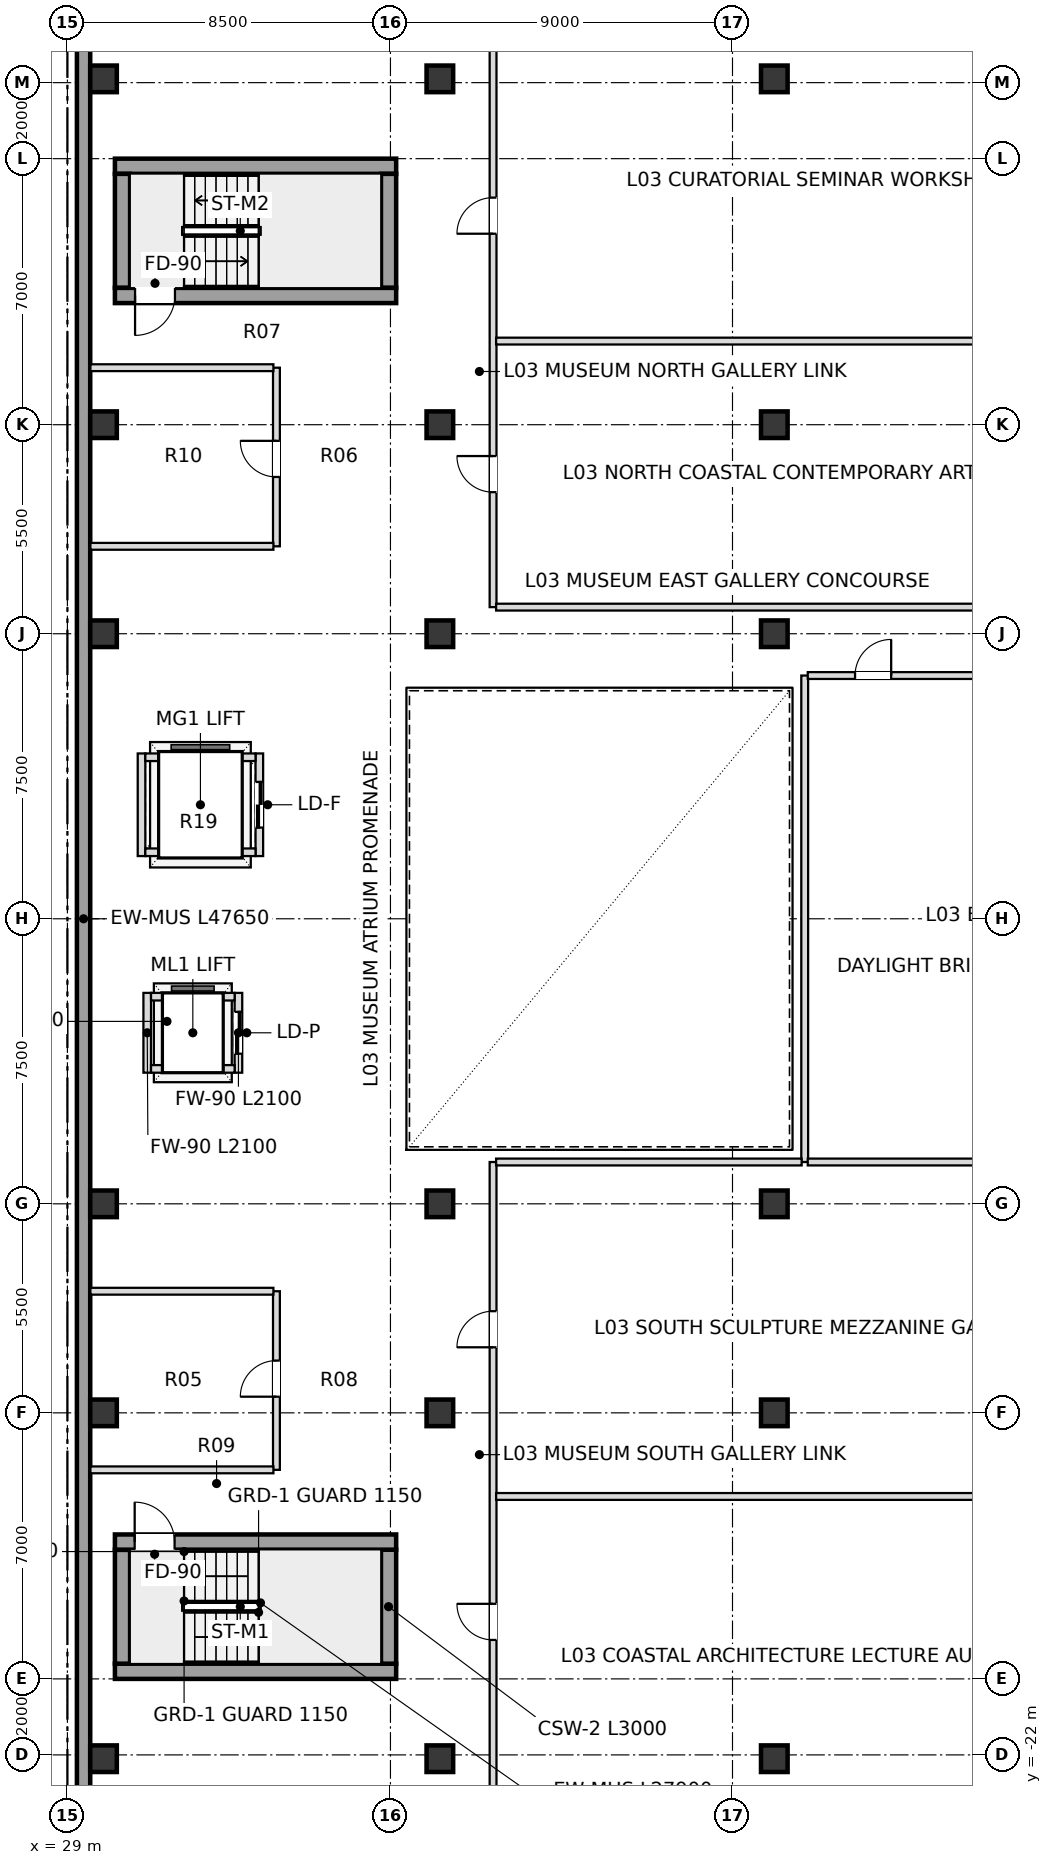
"""IFC4 building model, lengths in metres.
Left out: names, types, materials, properties, quantities, classifications, styles, units other than length and angle.
Written with IfcOpenShell. Run it as: python <this file> out.ifc"""

import sys

from ifc_helpers import new_model, si_unit, direction, frame, frame_2d, origin, origin_2d, place, context, subcontext, project, spatial, rectangle, extrude, element, fill, save


model = new_model("IFC4")
c1 = context("Model", 3, precision=1e-05, world=origin(), true_north=direction((0.0, 1.0)))
c2 = subcontext(c1, "Body", "Model", "MODEL_VIEW")
j1 = project(units=[si_unit("LENGTHUNIT", "METRE"), si_unit("PLANEANGLEUNIT", "RADIAN")], contexts=[c1])
p1 = place(None, origin())
s1 = spatial("IfcSite", under=j1, at=p1, CompositionType="ELEMENT")
p2 = place(p1, origin())
s2 = spatial("IfcBuilding", under=s1, at=p2, CompositionType="ELEMENT")
p3 = place(p2, frame((0.0, 0.0, 16.8)))
s3 = spatial("IfcBuildingStorey", under=s2, at=p3, CompositionType="ELEMENT", Elevation=16.8)
for number, where, z_axis, x_axis in (
    (1, (29.95, -22.1, 0.0), (0.0, 0.0, 1.0), (1.0, 0.0, 0.0)),
    (2, (29.95, -13.0, 0.0), (0.0, 0.0, 1.0), (1.0, 0.0, 0.0)),
    (3, (29.95, -7.5, 0.0), (0.0, 0.0, 1.0), (1.0, 0.0, 0.0)),
    (4, (29.95, 7.5, 0.0), (0.0, 0.0, 1.0), (1.0, 0.0, 0.0)),
    (5, (29.95, 13.0, 0.0), (0.0, 0.0, 1.0), (1.0, 0.0, 0.0)),
    (6, (29.95, 22.1, 0.0), (0.0, 0.0, 1.0), (1.0, 0.0, 0.0)),
    (7, (38.8, -22.1, 0.0), (0.0, 0.0, 1.0), (1.0, 0.0, 0.0)),
    (8, (38.8, -13.0, 0.0), (0.0, 0.0, 1.0), (1.0, 0.0, 0.0)),
    (9, (38.8, -7.5, 0.0), (0.0, 0.0, 1.0), (1.0, 0.0, 0.0)),
    (10, (38.8, 7.5, 0.0), (0.0, 0.0, 1.0), (1.0, 0.0, 0.0)),
    (11, (38.8, 13.0, 0.0), (0.0, 0.0, 1.0), (1.0, 0.0, 0.0)),
    (12, (38.8, 22.1, 0.0), (0.0, 0.0, 1.0), (1.0, 0.0, 0.0)),
    (13, (47.6, -22.1, 0.0), (0.0, 0.0, 1.0), (1.0, 0.0, 0.0)),
    (14, (47.6, -13.0, 0.0), (0.0, 0.0, 1.0), (1.0, 0.0, 0.0)),
    (15, (47.6, -7.5, 0.0), (0.0, 0.0, 1.0), (1.0, 0.0, 0.0)),
    (16, (47.6, 7.5, 0.0), (0.0, 0.0, 1.0), (1.0, 0.0, 0.0)),
    (17, (47.6, 13.0, 0.0), (0.0, 0.0, 1.0), (1.0, 0.0, 0.0)),
    (18, (47.6, 22.1, 0.0), (0.0, 0.0, 1.0), (1.0, 0.0, 0.0)),
):
    element("IfcColumn", number, at=place(p3, frame(where, z_axis=z_axis, x_axis=x_axis)), inside=s3, PredefinedType="COLUMN", context=c2, shape_type="SweptSolid", body=[
        extrude(rectangle(XDim=0.7, YDim=0.7, at=origin_2d()), origin(), (0.0, 0.0, 1.0), 5.4),
    ])
p4 = place(p3, frame((29.425, 23.825, 0.0), z_axis=(0.0, 0.0, 1.0), x_axis=(0.0, -1.0, 0.0)))
e19 = element("IfcWall", 19, at=p4, inside=s3, PredefinedType="SOLIDWALL", context=c2, shape_type="SweptSolid", body=[
    extrude(rectangle(XDim=47.65, YDim=0.35, at=frame_2d((23.825, 0.0))), origin(), (0.0, 0.0, 1.0), 5.08),
])
p5 = place(p3, frame((37.65, -19.8, 0.0), z_axis=(0.0, 0.0, 1.0), x_axis=(-1.0, 0.0, 0.0)))
e20 = element("IfcWall", 20, at=p5, inside=s3, PredefinedType="SHEAR", context=c2, shape_type="SweptSolid", body=[
    extrude(rectangle(XDim=7.4, YDim=0.4, at=frame_2d((3.7, 0.0))), origin(), (0.0, 0.0, 1.0), 5.08),
])
for number, where, z_axis, x_axis in (
    (21, (37.45, -19.6, 0.0), (0.0, 0.0, 1.0), (0.0, 1.0, 0.0)),
    (22, (30.45, -19.6, 0.0), (0.0, 0.0, 1.0), (0.0, 1.0, 0.0)),
):
    element("IfcWall", number, at=place(p3, frame(where, z_axis=z_axis, x_axis=x_axis)), inside=s3, PredefinedType="SHEAR", context=c2, shape_type="SweptSolid", body=[
        extrude(rectangle(XDim=3.0, YDim=0.4, at=frame_2d((1.5, 0.0))), origin(), (0.0, 0.0, 1.0), 5.08),
    ])
p6 = place(p3, frame((30.25, -16.4, 0.0), z_axis=(0.0, 0.0, 1.0), x_axis=(1.0, 0.0, 0.0)))
e23 = element("IfcWall", 23, at=p6, inside=s3, PredefinedType="SHEAR", context=c2, shape_type="SweptSolid", body=[
    extrude(rectangle(XDim=7.4, YDim=0.4, at=frame_2d((3.7, 0.0))), origin(), (0.0, 0.0, 1.0), 5.08),
])
p7 = place(p6, frame((0.52, 0.0, 0.0)))
e24 = element("IfcOpeningElement", 24, at=p7, cuts=e23, PredefinedType="OPENING", context=c2, shape_type="SweptSolid", body=[
    extrude(rectangle(XDim=1.05, YDim=2.15, at=frame_2d((0.525, 1.075))), frame((0.0, 0.21, 0.0), z_axis=(0.0, -1.0, 0.0), x_axis=(1.0, 0.0, 0.0)), (0.0, 0.0, 1.0), 0.42),
])
p8 = place(p3, frame((30.25, 19.8, 0.0), z_axis=(0.0, 0.0, 1.0), x_axis=(1.0, 0.0, 0.0)))
e25 = element("IfcWall", 25, at=p8, inside=s3, PredefinedType="SHEAR", context=c2, shape_type="SweptSolid", body=[
    extrude(rectangle(XDim=7.4, YDim=0.4, at=frame_2d((3.7, 0.0))), origin(), (0.0, 0.0, 1.0), 5.08),
])
for number, where, z_axis, x_axis in (
    (26, (37.45, 16.6, 0.0), (0.0, 0.0, 1.0), (0.0, 1.0, 0.0)),
    (27, (30.45, 16.6, 0.0), (0.0, 0.0, 1.0), (0.0, 1.0, 0.0)),
):
    element("IfcWall", number, at=place(p3, frame(where, z_axis=z_axis, x_axis=x_axis)), inside=s3, PredefinedType="SHEAR", context=c2, shape_type="SweptSolid", body=[
        extrude(rectangle(XDim=3.0, YDim=0.4, at=frame_2d((1.5, 0.0))), origin(), (0.0, 0.0, 1.0), 5.08),
    ])
p9 = place(p3, frame((37.65, 16.4, 0.0), z_axis=(0.0, 0.0, 1.0), x_axis=(-1.0, 0.0, 0.0)))
e28 = element("IfcWall", 28, at=p9, inside=s3, PredefinedType="SHEAR", context=c2, shape_type="SweptSolid", body=[
    extrude(rectangle(XDim=7.4, YDim=0.4, at=frame_2d((3.7, 0.0))), origin(), (0.0, 0.0, 1.0), 5.08),
])
p10 = place(p9, frame((5.82, 0.0, 0.0)))
e29 = element("IfcOpeningElement", 29, at=p10, cuts=e28, PredefinedType="OPENING", context=c2, shape_type="SweptSolid", body=[
    extrude(rectangle(XDim=1.05, YDim=2.15, at=frame_2d((0.525, 1.075))), frame((0.0, 0.21, 0.0), z_axis=(0.0, -1.0, 0.0), x_axis=(1.0, 0.0, 0.0)), (0.0, 0.0, 1.0), 0.42),
])
p11 = place(p3, frame((33.5, -4.05, 0.0), z_axis=(0.0, 0.0, 1.0), x_axis=(0.0, 1.0, 0.0)))
e30 = element("IfcWall", 30, at=p11, inside=s3, PredefinedType="SOLIDWALL", context=c2, shape_type="SweptSolid", body=[
    extrude(rectangle(XDim=2.1, YDim=0.2, at=frame_2d((1.05, 0.0))), origin(), (0.0, 0.0, 1.0), 4.297),
])
p12 = place(p11, frame((0.5, 0.0, 0.0)))
e31 = element("IfcOpeningElement", 31, at=p12, cuts=e30, PredefinedType="OPENING", context=c2, shape_type="SweptSolid", body=[
    extrude(rectangle(XDim=1.1, YDim=2.15, at=frame_2d((0.55, 1.075))), frame((0.0, 0.11, 0.0), z_axis=(0.0, -1.0, 0.0), x_axis=(1.0, 0.0, 0.0)), (0.0, 0.0, 1.0), 0.22),
])
p13 = place(p3, frame((31.1, -4.05, 0.0), z_axis=(0.0, 0.0, 1.0), x_axis=(0.0, 1.0, 0.0)))
e32 = element("IfcWall", 32, at=p13, inside=s3, PredefinedType="SOLIDWALL", context=c2, shape_type="SweptSolid", body=[
    extrude(rectangle(XDim=2.1, YDim=0.2, at=frame_2d((1.05, 0.0))), origin(), (0.0, 0.0, 1.0), 4.297),
])
for number, where, z_axis, x_axis in (
    (33, (31.2, -3.95, 0.0), (0.0, 0.0, 1.0), (1.0, 0.0, 0.0)),
    (34, (31.2, -2.05, 0.0), (0.0, 0.0, 1.0), (1.0, 0.0, 0.0)),
):
    element("IfcWall", number, at=place(p3, frame(where, z_axis=z_axis, x_axis=x_axis)), inside=s3, PredefinedType="SOLIDWALL", context=c2, shape_type="SweptSolid", body=[
        extrude(rectangle(XDim=2.2, YDim=0.2, at=frame_2d((1.1, 0.0))), origin(), (0.0, 0.0, 1.0), 4.297),
    ])
p14 = place(p3, frame((34.05, 1.65, 0.0), z_axis=(0.0, 0.0, 1.0), x_axis=(0.0, 1.0, 0.0)))
e35 = element("IfcWall", 35, at=p14, inside=s3, PredefinedType="SOLIDWALL", context=c2, shape_type="SweptSolid", body=[
    extrude(rectangle(XDim=2.7, YDim=0.2, at=frame_2d((1.35, 0.0))), origin(), (0.0, 0.0, 1.0), 4.297),
])
p15 = place(p14, frame((0.75, 0.0, 0.0)))
e36 = element("IfcOpeningElement", 36, at=p15, cuts=e35, PredefinedType="OPENING", context=c2, shape_type="SweptSolid", body=[
    extrude(rectangle(XDim=1.2, YDim=2.2, at=frame_2d((0.6, 1.1))), frame((0.0, 0.11, 0.0), z_axis=(0.0, -1.0, 0.0), x_axis=(1.0, 0.0, 0.0)), (0.0, 0.0, 1.0), 0.22),
])
p16 = place(p3, frame((30.95, 1.65, 0.0), z_axis=(0.0, 0.0, 1.0), x_axis=(0.0, 1.0, 0.0)))
e37 = element("IfcWall", 37, at=p16, inside=s3, PredefinedType="SOLIDWALL", context=c2, shape_type="SweptSolid", body=[
    extrude(rectangle(XDim=2.7, YDim=0.2, at=frame_2d((1.35, 0.0))), origin(), (0.0, 0.0, 1.0), 4.297),
])
for number, where, z_axis, x_axis in (
    (38, (31.05, 1.75, 0.0), (0.0, 0.0, 1.0), (1.0, 0.0, 0.0)),
    (39, (31.05, 4.25, 0.0), (0.0, 0.0, 1.0), (1.0, 0.0, 0.0)),
):
    element("IfcWall", number, at=place(p3, frame(where, z_axis=z_axis, x_axis=x_axis)), inside=s3, PredefinedType="SOLIDWALL", context=c2, shape_type="SweptSolid", body=[
        extrude(rectangle(XDim=2.9, YDim=0.2, at=frame_2d((1.45, 0.0))), origin(), (0.0, 0.0, 1.0), 4.297),
    ])
p17 = place(p3, frame((34.5, -14.5, 0.0), z_axis=(0.0, 0.0, 1.0), x_axis=(0.0, 1.0, 0.0)))
e40 = element("IfcWall", 40, at=p17, inside=s3, PredefinedType="PARTITIONING", context=c2, shape_type="SweptSolid", body=[
    extrude(rectangle(XDim=4.7, YDim=0.18, at=frame_2d((2.35, 0.0))), origin(), (0.0, 0.0, 1.0), 4.297),
])
p18 = place(p17, frame((1.925, 0.0, 0.0)))
e41 = element("IfcOpeningElement", 41, at=p18, cuts=e40, PredefinedType="OPENING", context=c2, shape_type="SweptSolid", body=[
    extrude(rectangle(XDim=0.95, YDim=2.15, at=frame_2d((0.475, 1.075))), frame((0.0, 0.1, 0.0), z_axis=(0.0, -1.0, 0.0), x_axis=(1.0, 0.0, 0.0)), (0.0, 0.0, 1.0), 0.2),
])
p19 = place(p3, frame((34.5, 9.8, 0.0), z_axis=(0.0, 0.0, 1.0), x_axis=(0.0, 1.0, 0.0)))
e42 = element("IfcWall", 42, at=p19, inside=s3, PredefinedType="PARTITIONING", context=c2, shape_type="SweptSolid", body=[
    extrude(rectangle(XDim=4.7, YDim=0.18, at=frame_2d((2.35, 0.0))), origin(), (0.0, 0.0, 1.0), 4.297),
])
p20 = place(p19, frame((1.825, 0.0, 0.0)))
e43 = element("IfcOpeningElement", 43, at=p20, cuts=e42, PredefinedType="OPENING", context=c2, shape_type="SweptSolid", body=[
    extrude(rectangle(XDim=0.95, YDim=2.15, at=frame_2d((0.475, 1.075))), frame((0.0, 0.1, 0.0), z_axis=(0.0, -1.0, 0.0), x_axis=(1.0, 0.0, 0.0)), (0.0, 0.0, 1.0), 0.2),
])
p21 = place(p3, frame((40.2, -23.645, 0.0), z_axis=(0.0, 0.0, 1.0), x_axis=(0.0, 1.0, 0.0)))
e44 = element("IfcWall", 44, at=p21, inside=s3, PredefinedType="PARTITIONING", context=c2, shape_type="SweptSolid", body=[
    extrude(rectangle(XDim=17.245, YDim=0.18, at=frame_2d((8.623, 0.0))), origin(), (0.0, 0.0, 1.0), 4.297),
])
p22 = place(p21, frame((4.67, 0.0, 0.0)))
e45 = element("IfcOpeningElement", 45, at=p22, cuts=e44, PredefinedType="OPENING", context=c2, shape_type="SweptSolid", body=[
    extrude(rectangle(XDim=0.95, YDim=2.15, at=frame_2d((0.475, 1.075))), frame((0.0, 0.1, 0.0), z_axis=(0.0, -1.0, 0.0), x_axis=(1.0, 0.0, 0.0)), (0.0, 0.0, 1.0), 0.2),
])
p23 = place(p21, frame((12.37, 0.0, 0.0)))
e46 = element("IfcOpeningElement", 46, at=p23, cuts=e44, PredefinedType="OPENING", context=c2, shape_type="SweptSolid", body=[
    extrude(rectangle(XDim=0.95, YDim=2.15, at=frame_2d((0.475, 1.075))), frame((0.0, 0.1, 0.0), z_axis=(0.0, -1.0, 0.0), x_axis=(1.0, 0.0, 0.0)), (0.0, 0.0, 1.0), 0.2),
])
p24 = place(p3, frame((40.2, 8.2, 0.0), z_axis=(0.0, 0.0, 1.0), x_axis=(0.0, 1.0, 0.0)))
e47 = element("IfcWall", 47, at=p24, inside=s3, PredefinedType="PARTITIONING", context=c2, shape_type="SweptSolid", body=[
    extrude(rectangle(XDim=15.52, YDim=0.18, at=frame_2d((7.76, 0.0))), origin(), (0.0, 0.0, 1.0), 4.297),
])
p25 = place(p24, frame((3.025, 0.0, 0.0)))
e48 = element("IfcOpeningElement", 48, at=p25, cuts=e47, PredefinedType="OPENING", context=c2, shape_type="SweptSolid", body=[
    extrude(rectangle(XDim=0.95, YDim=2.15, at=frame_2d((0.475, 1.075))), frame((0.0, 0.1, 0.0), z_axis=(0.0, -1.0, 0.0), x_axis=(1.0, 0.0, 0.0)), (0.0, 0.0, 1.0), 0.2),
])
p26 = place(p24, frame((9.825, 0.0, 0.0)))
e49 = element("IfcOpeningElement", 49, at=p26, cuts=e47, PredefinedType="OPENING", context=c2, shape_type="SweptSolid", body=[
    extrude(rectangle(XDim=0.95, YDim=2.15, at=frame_2d((0.475, 1.075))), frame((0.0, 0.1, 0.0), z_axis=(0.0, -1.0, 0.0), x_axis=(1.0, 0.0, 0.0)), (0.0, 0.0, 1.0), 0.2),
])
p27 = place(p3, frame((48.4, -6.4, 0.0), z_axis=(0.0, 0.0, 1.0), x_axis=(0.0, 1.0, 0.0)))
e50 = element("IfcWall", 50, at=p27, inside=s3, PredefinedType="PARTITIONING", context=c2, shape_type="SweptSolid", body=[
    extrude(rectangle(XDim=12.8, YDim=0.18, at=frame_2d((6.4, 0.0))), origin(), (0.0, 0.0, 1.0), 5.08),
])
p28 = place(p3, frame((40.28, -15.2, 0.0), z_axis=(0.0, 0.0, 1.0), x_axis=(1.0, 0.0, 0.0)))
e51 = element("IfcWall", 51, at=p28, inside=s3, PredefinedType="PARTITIONING", context=c2, shape_type="SweptSolid", body=[
    extrude(rectangle(XDim=16.865, YDim=0.18, at=frame_2d((8.433, 0.0))), origin(), (0.0, 0.0, 1.0), 4.214),
])
p29 = place(p3, frame((29.605, -14.5, 0.0), z_axis=(0.0, 0.0, 1.0), x_axis=(1.0, 0.0, 0.0)))
e52 = element("IfcWall", 52, at=p29, inside=s3, PredefinedType="PARTITIONING", context=c2, shape_type="SweptSolid", body=[
    extrude(rectangle(XDim=4.815, YDim=0.18, at=frame_2d((2.407, 0.0))), origin(), (0.0, 0.0, 1.0), 4.214),
])
p30 = place(p3, frame((29.605, -9.8, 0.0), z_axis=(0.0, 0.0, 1.0), x_axis=(1.0, 0.0, 0.0)))
e53 = element("IfcWall", 53, at=p30, inside=s3, PredefinedType="PARTITIONING", context=c2, shape_type="SweptSolid", body=[
    extrude(rectangle(XDim=4.815, YDim=0.18, at=frame_2d((2.407, 0.0))), origin(), (0.0, 0.0, 1.0), 4.297),
])
p31 = place(p3, frame((40.28, -6.4, 0.0), z_axis=(0.0, 0.0, 1.0), x_axis=(1.0, 0.0, 0.0)))
e54 = element("IfcWall", 54, at=p31, inside=s3, PredefinedType="PARTITIONING", context=c2, shape_type="SweptSolid", body=[
    extrude(rectangle(XDim=8.04, YDim=0.18, at=frame_2d((4.02, 0.0))), origin(), (0.0, 0.0, 1.0), 4.297),
])
p32 = place(p3, frame((48.48, -6.4, 0.0), z_axis=(0.0, 0.0, 1.0), x_axis=(1.0, 0.0, 0.0)))
e55 = element("IfcWall", 55, at=p32, inside=s3, PredefinedType="PARTITIONING", context=c2, shape_type="SweptSolid", body=[
    extrude(rectangle(XDim=8.665, YDim=0.18, at=frame_2d((4.333, 0.0))), origin(), (0.0, 0.0, 1.0), 4.297),
])
p33 = place(p3, frame((48.48, 6.4, 0.0), z_axis=(0.0, 0.0, 1.0), x_axis=(1.0, 0.0, 0.0)))
e56 = element("IfcWall", 56, at=p33, inside=s3, PredefinedType="PARTITIONING", context=c2, shape_type="SweptSolid", body=[
    extrude(rectangle(XDim=8.665, YDim=0.18, at=frame_2d((4.333, 0.0))), origin(), (0.0, 0.0, 1.0), 4.297),
])
p34 = place(p33, frame((1.245, 0.0, 0.0)))
e57 = element("IfcOpeningElement", 57, at=p34, cuts=e56, PredefinedType="OPENING", context=c2, shape_type="SweptSolid", body=[
    extrude(rectangle(XDim=0.95, YDim=2.15, at=frame_2d((0.475, 1.075))), frame((0.0, 0.1, 0.0), z_axis=(0.0, -1.0, 0.0), x_axis=(1.0, 0.0, 0.0)), (0.0, 0.0, 1.0), 0.2),
])
p35 = place(p3, frame((40.28, 8.2, 0.0), z_axis=(0.0, 0.0, 1.0), x_axis=(1.0, 0.0, 0.0)))
e58 = element("IfcWall", 58, at=p35, inside=s3, PredefinedType="PARTITIONING", context=c2, shape_type="SweptSolid", body=[
    extrude(rectangle(XDim=16.865, YDim=0.18, at=frame_2d((8.433, 0.0))), origin(), (0.0, 0.0, 1.0), 4.297),
])
for number, where, z_axis, x_axis in (
    (59, (29.605, 9.8, 0.0), (0.0, 0.0, 1.0), (1.0, 0.0, 0.0)),
    (60, (29.605, 14.5, 0.0), (0.0, 0.0, 1.0), (1.0, 0.0, 0.0)),
):
    element("IfcWall", number, at=place(p3, frame(where, z_axis=z_axis, x_axis=x_axis)), inside=s3, PredefinedType="PARTITIONING", context=c2, shape_type="SweptSolid", body=[
        extrude(rectangle(XDim=4.815, YDim=0.18, at=frame_2d((2.407, 0.0))), origin(), (0.0, 0.0, 1.0), 4.297),
    ])
p36 = place(p3, frame((40.28, 15.2, 0.0), z_axis=(0.0, 0.0, 1.0), x_axis=(1.0, 0.0, 0.0)))
e61 = element("IfcWall", 61, at=p36, inside=s3, PredefinedType="PARTITIONING", context=c2, shape_type="SweptSolid", body=[
    extrude(rectangle(XDim=16.865, YDim=0.18, at=frame_2d((8.433, 0.0))), origin(), (0.0, 0.0, 1.0), 4.297),
])
p37 = place(p7, origin())
e62 = element("IfcDoor", 62, at=p37, inside=s3, OperationType="SINGLE_SWING_LEFT", PredefinedType="DOOR", context=c2, shape_type="SweptSolid", body=[
    extrude(rectangle(XDim=1.05, YDim=2.15, at=frame_2d((0.525, 1.075))), frame((0.0, 0.025, 0.0), z_axis=(0.0, -1.0, 0.0), x_axis=(1.0, 0.0, 0.0)), (0.0, 0.0, 1.0), 0.05),
])
fill(e24, e62)
p38 = place(p10, origin())
e63 = element("IfcDoor", 63, at=p38, inside=s3, OperationType="SINGLE_SWING_RIGHT", PredefinedType="DOOR", context=c2, shape_type="SweptSolid", body=[
    extrude(rectangle(XDim=1.05, YDim=2.15, at=frame_2d((0.525, 1.075))), frame((0.0, 0.025, 0.0), z_axis=(0.0, -1.0, 0.0), x_axis=(1.0, 0.0, 0.0)), (0.0, 0.0, 1.0), 0.05),
])
fill(e29, e63)
p39 = place(p12, origin())
e64 = element("IfcDoor", 64, at=p39, inside=s3, OperationType="DOUBLE_DOOR_SLIDING", PredefinedType="DOOR", context=c2, shape_type="SweptSolid", body=[
    extrude(rectangle(XDim=1.1, YDim=2.15, at=frame_2d((0.55, 1.075))), frame((0.0, 0.025, 0.0), z_axis=(0.0, -1.0, 0.0), x_axis=(1.0, 0.0, 0.0)), (0.0, 0.0, 1.0), 0.05),
])
fill(e31, e64)
p40 = place(p15, origin())
e65 = element("IfcDoor", 65, at=p40, inside=s3, OperationType="DOUBLE_DOOR_SLIDING", PredefinedType="DOOR", context=c2, shape_type="SweptSolid", body=[
    extrude(rectangle(XDim=1.2, YDim=2.2, at=frame_2d((0.6, 1.1))), frame((0.0, 0.025, 0.0), z_axis=(0.0, -1.0, 0.0), x_axis=(1.0, 0.0, 0.0)), (0.0, 0.0, 1.0), 0.05),
])
fill(e36, e65)
p41 = place(p25, origin())
e66 = element("IfcDoor", 66, at=p41, inside=s3, OperationType="SINGLE_SWING_RIGHT", PredefinedType="DOOR", context=c2, shape_type="SweptSolid", body=[
    extrude(rectangle(XDim=0.95, YDim=2.15, at=frame_2d((0.475, 1.075))), frame((0.0, 0.025, 0.0), z_axis=(0.0, -1.0, 0.0), x_axis=(1.0, 0.0, 0.0)), (0.0, 0.0, 1.0), 0.05),
])
fill(e48, e66)
p42 = place(p26, origin())
e67 = element("IfcDoor", 67, at=p42, inside=s3, OperationType="SINGLE_SWING_LEFT", PredefinedType="DOOR", context=c2, shape_type="SweptSolid", body=[
    extrude(rectangle(XDim=0.95, YDim=2.15, at=frame_2d((0.475, 1.075))), frame((0.0, 0.025, 0.0), z_axis=(0.0, -1.0, 0.0), x_axis=(1.0, 0.0, 0.0)), (0.0, 0.0, 1.0), 0.05),
])
fill(e49, e67)
p43 = place(p20, origin())
e68 = element("IfcDoor", 68, at=p43, inside=s3, OperationType="SINGLE_SWING_RIGHT", PredefinedType="DOOR", context=c2, shape_type="SweptSolid", body=[
    extrude(rectangle(XDim=0.95, YDim=2.15, at=frame_2d((0.475, 1.075))), frame((0.0, 0.025, 0.0), z_axis=(0.0, -1.0, 0.0), x_axis=(1.0, 0.0, 0.0)), (0.0, 0.0, 1.0), 0.05),
])
fill(e43, e68)
p44 = place(p18, origin())
e69 = element("IfcDoor", 69, at=p44, inside=s3, OperationType="SINGLE_SWING_LEFT", PredefinedType="DOOR", context=c2, shape_type="SweptSolid", body=[
    extrude(rectangle(XDim=0.95, YDim=2.15, at=frame_2d((0.475, 1.075))), frame((0.0, 0.025, 0.0), z_axis=(0.0, -1.0, 0.0), x_axis=(1.0, 0.0, 0.0)), (0.0, 0.0, 1.0), 0.05),
])
fill(e41, e69)
p45 = place(p22, origin())
e70 = element("IfcDoor", 70, at=p45, inside=s3, OperationType="SINGLE_SWING_RIGHT", PredefinedType="DOOR", context=c2, shape_type="SweptSolid", body=[
    extrude(rectangle(XDim=0.95, YDim=2.15, at=frame_2d((0.475, 1.075))), frame((0.0, 0.025, 0.0), z_axis=(0.0, -1.0, 0.0), x_axis=(1.0, 0.0, 0.0)), (0.0, 0.0, 1.0), 0.05),
])
fill(e45, e70)
p46 = place(p23, origin())
e71 = element("IfcDoor", 71, at=p46, inside=s3, OperationType="SINGLE_SWING_LEFT", PredefinedType="DOOR", context=c2, shape_type="SweptSolid", body=[
    extrude(rectangle(XDim=0.95, YDim=2.15, at=frame_2d((0.475, 1.075))), frame((0.0, 0.025, 0.0), z_axis=(0.0, -1.0, 0.0), x_axis=(1.0, 0.0, 0.0)), (0.0, 0.0, 1.0), 0.05),
])
fill(e46, e71)
p47 = place(p34, origin())
e72 = element("IfcDoor", 72, at=p47, inside=s3, OperationType="SINGLE_SWING_RIGHT", PredefinedType="DOOR", context=c2, shape_type="SweptSolid", body=[
    extrude(rectangle(XDim=0.95, YDim=2.15, at=frame_2d((0.475, 1.075))), frame((0.0, 0.025, 0.0), z_axis=(0.0, -1.0, 0.0), x_axis=(1.0, 0.0, 0.0)), (0.0, 0.0, 1.0), 0.05),
])
fill(e57, e72)
save(model, sys.argv[1])
